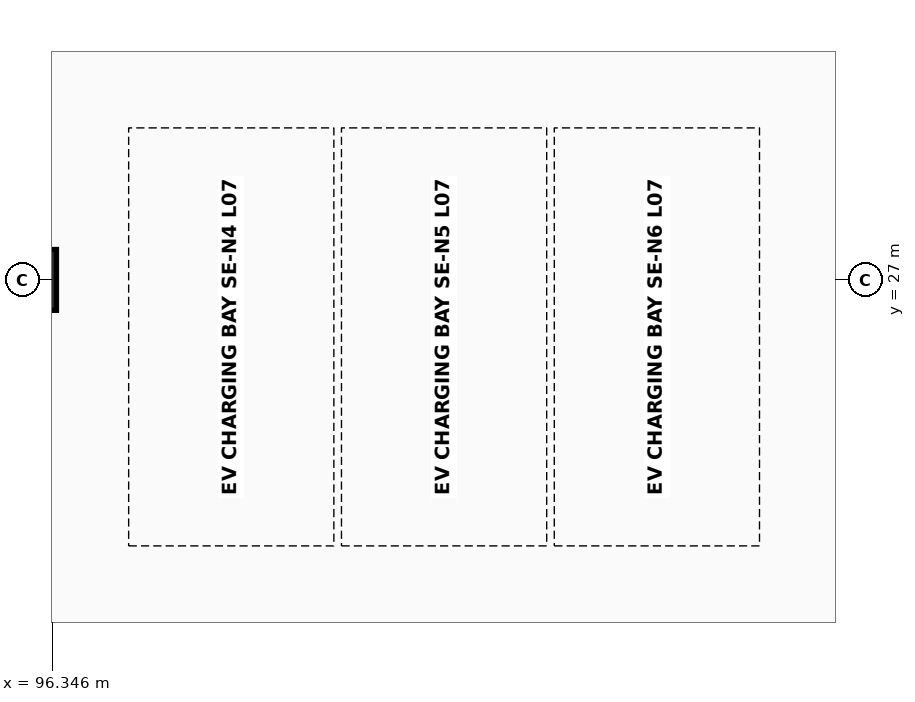
"""IFC4 building model, lengths in metres.
Left out: names, types, materials, properties, quantities, classifications, styles, units other than length and angle.
Written with IfcOpenShell. Run it as: python <this file> out.ifc"""

import sys

from ifc_helpers import new_model, si_unit, direction, frame, origin, origin_2d, place, context, subcontext, project, spatial, rectangle, extrude, element, save


model = new_model("IFC4")
c1 = context("Model", 3, precision=1e-05, world=origin(), true_north=direction((0.0, 1.0)))
c2 = subcontext(c1, "Body", "Model", "MODEL_VIEW")
j1 = project(units=[si_unit("LENGTHUNIT", "METRE"), si_unit("PLANEANGLEUNIT", "RADIAN")], contexts=[c1])
p1 = place(None, origin())
s1 = spatial("IfcSite", under=j1, at=p1, CompositionType="ELEMENT")
p2 = place(p1, origin())
s2 = spatial("IfcBuilding", under=s1, at=p2, CompositionType="ELEMENT")
p3 = place(p2, frame((0.0, 0.0, 28.6)))
s3 = spatial("IfcBuildingStorey", under=s2, at=p3, CompositionType="ELEMENT", Elevation=28.6)
p4 = place(p3, frame((96.0, 27.0, 0.0), z_axis=(0.0, 0.0, 1.0), x_axis=(1.0, 0.0, 0.0)))
e1 = element("IfcColumn", 1, at=p4, inside=s3, PredefinedType="COLUMN", context=c2, shape_type="SweptSolid", body=[
    extrude(rectangle(XDim=0.8, YDim=0.8, at=origin_2d()), origin(), (0.0, 0.0, 1.0), 3.8),
])
save(model, sys.argv[1])
